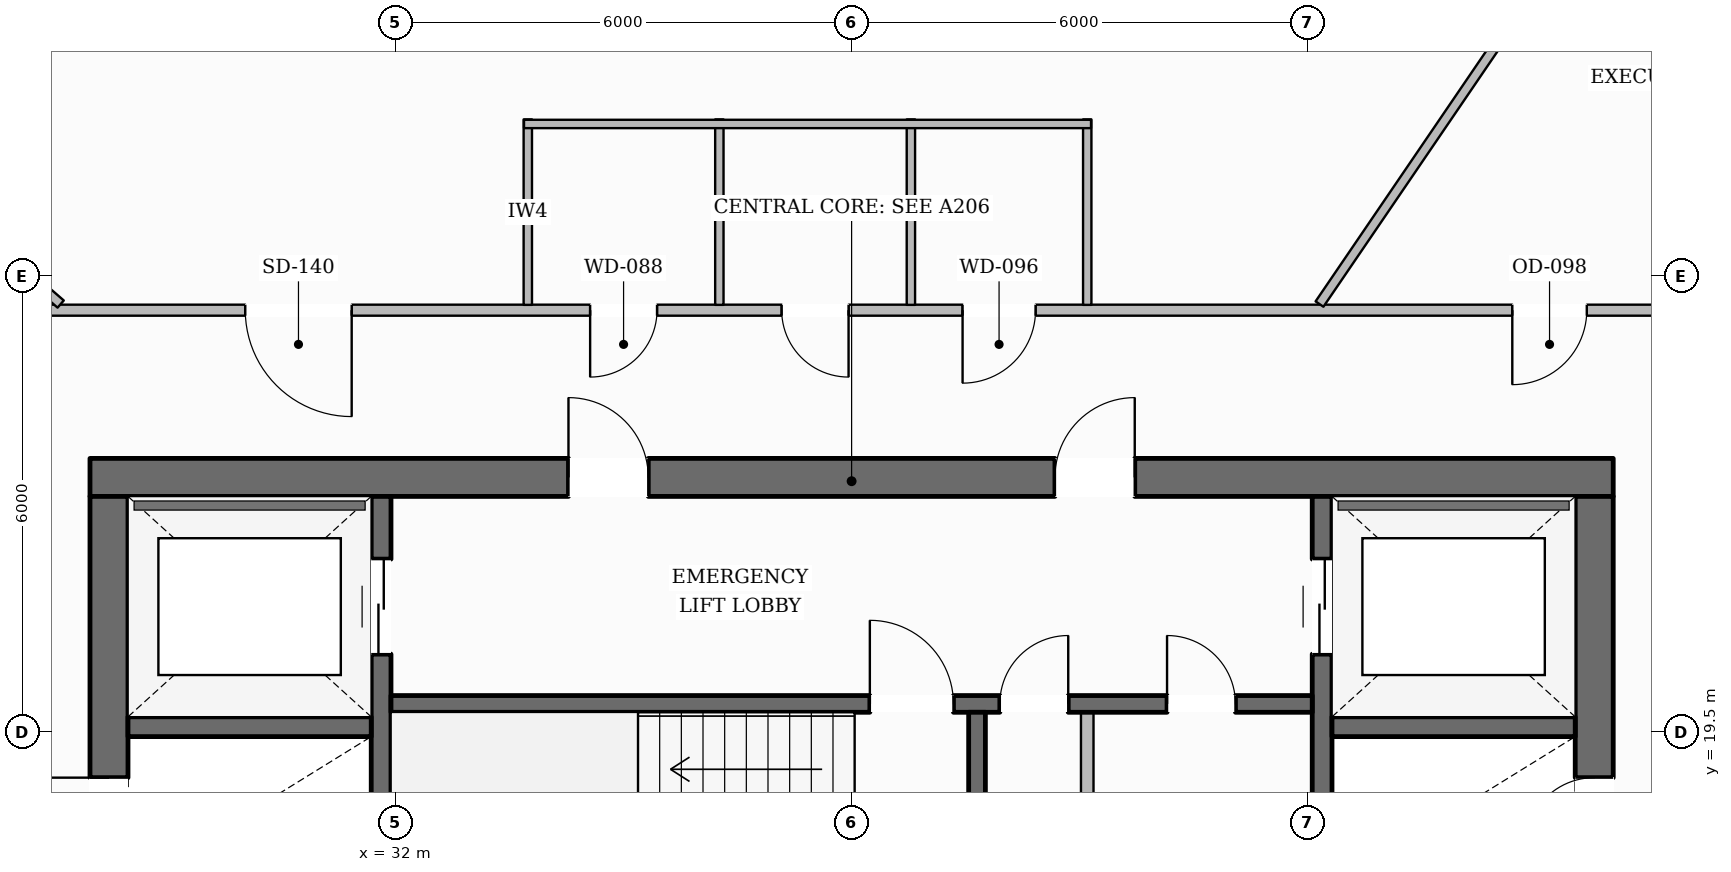
"""IFC4 building model, lengths in metres.
Left out: names, types, materials, properties, quantities, classifications, styles, units other than length and angle.
Written with IfcOpenShell. Run it as: python <this file> out.ifc"""

import sys

from ifc_helpers import new_model, si_unit, direction, frame, frame_2d, origin, place, context, subcontext, project, spatial, rectangle, extrude, element, fill, save


model = new_model("IFC4")
c1 = context("Model", 3, precision=1e-05, world=origin(), true_north=direction((0.0, 1.0)))
c2 = subcontext(c1, "Body", "Model", "MODEL_VIEW")
j1 = project(units=[si_unit("LENGTHUNIT", "METRE"), si_unit("PLANEANGLEUNIT", "RADIAN")], contexts=[c1])
p1 = place(None, origin())
s1 = spatial("IfcSite", under=j1, at=p1, CompositionType="ELEMENT")
p2 = place(p1, origin())
s2 = spatial("IfcBuilding", under=s1, at=p2, CompositionType="ELEMENT")
p3 = place(p2, frame((0.0, 0.0, 112.45)))
s3 = spatial("IfcBuildingStorey", under=s2, at=p3, CompositionType="ELEMENT", Elevation=112.45)
p4 = place(p3, frame((27.98, 22.85, 0.0), z_axis=(0.0, 0.0, 1.0), x_axis=(1.0, 0.0, 0.0)))
e1 = element("IfcWall", 1, at=p4, inside=s3, PredefinedType="SOLIDWALL", context=c2, shape_type="SweptSolid", body=[
    extrude(rectangle(XDim=20.04, YDim=0.5, at=frame_2d((10.02, 0.0))), origin(), (0.0, 0.0, 1.0), 3.6),
])
p5 = place(p4, frame((6.295, 0.0, 0.0)))
e2 = element("IfcOpeningElement", 2, at=p5, cuts=e1, PredefinedType="OPENING", context=c2, shape_type="SweptSolid", body=[
    extrude(rectangle(XDim=1.05, YDim=2.15, at=frame_2d((0.525, 1.075))), frame((0.0, 0.26, 0.0), z_axis=(0.0, -1.0, 0.0), x_axis=(1.0, 0.0, 0.0)), (0.0, 0.0, 1.0), 0.52),
])
p6 = place(p4, frame((12.695, 0.0, 0.0)))
e3 = element("IfcOpeningElement", 3, at=p6, cuts=e1, PredefinedType="OPENING", context=c2, shape_type="SweptSolid", body=[
    extrude(rectangle(XDim=1.05, YDim=2.15, at=frame_2d((0.525, 1.075))), frame((0.0, 0.26, 0.0), z_axis=(0.0, -1.0, 0.0), x_axis=(1.0, 0.0, 0.0)), (0.0, 0.0, 1.0), 0.52),
])
p7 = place(p3, frame((28.23, 9.6, 0.0), z_axis=(0.0, 0.0, 1.0), x_axis=(0.0, 1.0, 0.0)))
e4 = element("IfcWall", 4, at=p7, inside=s3, PredefinedType="SOLIDWALL", context=c2, shape_type="SweptSolid", body=[
    extrude(rectangle(XDim=13.0, YDim=0.5, at=frame_2d((6.5, 0.0))), origin(), (0.0, 0.0, 1.0), 3.6),
])
p8 = place(p7, frame((0.2, 0.0, 0.0)))
e5 = element("IfcOpeningElement", 5, at=p8, cuts=e4, PredefinedType="OPENING", context=c2, shape_type="SweptSolid", body=[
    extrude(rectangle(XDim=1.1, YDim=2.15, at=frame_2d((0.55, 1.075))), frame((0.0, 0.26, 0.0), z_axis=(0.0, -1.0, 0.0), x_axis=(1.0, 0.0, 0.0)), (0.0, 0.0, 1.0), 0.52),
])
p9 = place(p7, frame((8.4, 0.0, 0.0)))
e6 = element("IfcOpeningElement", 6, at=p9, cuts=e4, PredefinedType="OPENING", context=c2, shape_type="SweptSolid", body=[
    extrude(rectangle(XDim=0.9, YDim=2.1, at=frame_2d((0.45, 1.05))), frame((0.0, 0.26, 0.0), z_axis=(0.0, -1.0, 0.0), x_axis=(1.0, 0.0, 0.0)), (0.0, 0.0, 1.0), 0.52),
])
p10 = place(p3, frame((47.77, 9.6, 0.0), z_axis=(0.0, 0.0, 1.0), x_axis=(0.0, 1.0, 0.0)))
e7 = element("IfcWall", 7, at=p10, inside=s3, PredefinedType="SOLIDWALL", context=c2, shape_type="SweptSolid", body=[
    extrude(rectangle(XDim=13.0, YDim=0.5, at=frame_2d((6.5, 0.0))), origin(), (0.0, 0.0, 1.0), 3.6),
])
p11 = place(p10, frame((0.2, 0.0, 0.0)))
e8 = element("IfcOpeningElement", 8, at=p11, cuts=e7, PredefinedType="OPENING", context=c2, shape_type="SweptSolid", body=[
    extrude(rectangle(XDim=1.1, YDim=2.15, at=frame_2d((0.55, 1.075))), frame((0.0, 0.26, 0.0), z_axis=(0.0, -1.0, 0.0), x_axis=(1.0, 0.0, 0.0)), (0.0, 0.0, 1.0), 0.52),
])
p12 = place(p10, frame((8.4, 0.0, 0.0)))
e9 = element("IfcOpeningElement", 9, at=p12, cuts=e7, PredefinedType="OPENING", context=c2, shape_type="SweptSolid", body=[
    extrude(rectangle(XDim=0.9, YDim=2.1, at=frame_2d((0.45, 1.05))), frame((0.0, 0.26, 0.0), z_axis=(0.0, -1.0, 0.0), x_axis=(1.0, 0.0, 0.0)), (0.0, 0.0, 1.0), 0.52),
])
p13 = place(p3, frame((31.81, 9.6, 0.0), z_axis=(0.0, 0.0, 1.0), x_axis=(0.0, 1.0, 0.0)))
e10 = element("IfcWall", 10, at=p13, inside=s3, PredefinedType="SHEAR", context=c2, shape_type="SweptSolid", body=[
    extrude(rectangle(XDim=13.0, YDim=0.26, at=frame_2d((6.5, 0.0))), origin(), (0.0, 0.0, 1.0), 3.6),
])
p14 = place(p13, frame((10.925, 0.0, 0.0)))
e11 = element("IfcOpeningElement", 11, at=p14, cuts=e10, PredefinedType="OPENING", context=c2, shape_type="SweptSolid", body=[
    extrude(rectangle(XDim=1.25, YDim=2.25, at=frame_2d((0.625, 1.125))), frame((0.0, 0.14, 0.0), z_axis=(0.0, -1.0, 0.0), x_axis=(1.0, 0.0, 0.0)), (0.0, 0.0, 1.0), 0.28),
])
p15 = place(p3, frame((44.19, 9.6, 0.0), z_axis=(0.0, 0.0, 1.0), x_axis=(0.0, 1.0, 0.0)))
e12 = element("IfcWall", 12, at=p15, inside=s3, PredefinedType="SHEAR", context=c2, shape_type="SweptSolid", body=[
    extrude(rectangle(XDim=13.0, YDim=0.26, at=frame_2d((6.5, 0.0))), origin(), (0.0, 0.0, 1.0), 3.6),
])
p16 = place(p15, frame((10.925, 0.0, 0.0)))
e13 = element("IfcOpeningElement", 13, at=p16, cuts=e12, PredefinedType="OPENING", context=c2, shape_type="SweptSolid", body=[
    extrude(rectangle(XDim=1.25, YDim=2.25, at=frame_2d((0.625, 1.125))), frame((0.0, 0.14, 0.0), z_axis=(0.0, -1.0, 0.0), x_axis=(1.0, 0.0, 0.0)), (0.0, 0.0, 1.0), 0.28),
])
for number, where, z_axis, x_axis in (
    (14, (28.48, 19.57, 0.0), (0.0, 0.0, 1.0), (1.0, 0.0, 0.0)),
    (15, (44.32, 19.57, 0.0), (0.0, 0.0, 1.0), (1.0, 0.0, 0.0)),
):
    element("IfcWall", number, at=place(p3, frame(where, z_axis=z_axis, x_axis=x_axis)), inside=s3, PredefinedType="SHEAR", context=c2, shape_type="SweptSolid", body=[
        extrude(rectangle(XDim=3.2, YDim=0.26, at=frame_2d((1.6, 0.0))), origin(), (0.0, 0.0, 1.0), 3.6),
    ])
p17 = place(p3, frame((31.94, 19.87, 0.0), z_axis=(0.0, 0.0, 1.0), x_axis=(1.0, 0.0, 0.0)))
e16 = element("IfcWall", 16, at=p17, inside=s3, PredefinedType="SOLIDWALL", context=c2, shape_type="SweptSolid", body=[
    extrude(rectangle(XDim=12.12, YDim=0.22, at=frame_2d((6.06, 0.0))), origin(), (0.0, 0.0, 1.0), 3.6),
])
p18 = place(p17, frame((6.3, 0.0, 0.0)))
e17 = element("IfcOpeningElement", 17, at=p18, cuts=e16, PredefinedType="OPENING", context=c2, shape_type="SweptSolid", body=[
    extrude(rectangle(XDim=1.1, YDim=2.15, at=frame_2d((0.55, 1.075))), frame((0.0, 0.12, 0.0), z_axis=(0.0, -1.0, 0.0), x_axis=(1.0, 0.0, 0.0)), (0.0, 0.0, 1.0), 0.24),
])
p19 = place(p17, frame((8.01, 0.0, 0.0)))
e18 = element("IfcOpeningElement", 18, at=p19, cuts=e16, PredefinedType="OPENING", context=c2, shape_type="SweptSolid", body=[
    extrude(rectangle(XDim=0.9, YDim=2.1, at=frame_2d((0.45, 1.05))), frame((0.0, 0.12, 0.0), z_axis=(0.0, -1.0, 0.0), x_axis=(1.0, 0.0, 0.0)), (0.0, 0.0, 1.0), 0.24),
])
p20 = place(p17, frame((10.21, 0.0, 0.0)))
e19 = element("IfcOpeningElement", 19, at=p20, cuts=e16, PredefinedType="OPENING", context=c2, shape_type="SweptSolid", body=[
    extrude(rectangle(XDim=0.9, YDim=2.1, at=frame_2d((0.45, 1.05))), frame((0.0, 0.12, 0.0), z_axis=(0.0, -1.0, 0.0), x_axis=(1.0, 0.0, 0.0)), (0.0, 0.0, 1.0), 0.24),
])
p21 = place(p3, frame((39.65, 16.56, 0.0), z_axis=(0.0, 0.0, 1.0), x_axis=(0.0, 1.0, 0.0)))
e20 = element("IfcWall", 20, at=p21, inside=s3, PredefinedType="SOLIDWALL", context=c2, shape_type="SweptSolid", body=[
    extrude(rectangle(XDim=3.2, YDim=0.22, at=frame_2d((1.6, 0.0))), origin(), (0.0, 0.0, 1.0), 3.6),
])
p22 = place(p3, frame((14.144, 13.219, 0.0), z_axis=(0.0, 0.0, 1.0), x_axis=(0.494900960409, 0.868949388277, 0.0)))
e21 = element("IfcWall", 21, at=p22, inside=s3, PredefinedType="STANDARD", context=c2, shape_type="SweptSolid", body=[
    extrude(rectangle(XDim=36.225, YDim=0.38, at=frame_2d((18.113, 0.0))), origin(), (0.0, 0.0, 1.0), 3.059),
])
p23 = place(p22, frame((32.03, 0.0, 0.65)))
e22 = element("IfcOpeningElement", 22, at=p23, cuts=e21, PredefinedType="OPENING", context=c2, shape_type="SweptSolid", body=[
    extrude(rectangle(XDim=1.55, YDim=1.75, at=frame_2d((0.775, 0.875))), frame((0.0, 0.2, 0.0), z_axis=(0.0, -1.0, 0.0), x_axis=(1.0, 0.0, 0.0)), (0.0, 0.0, 1.0), 0.4),
])
p24 = place(p22, frame((26.152, 0.0, 0.65)))
e23 = element("IfcOpeningElement", 23, at=p24, cuts=e21, PredefinedType="OPENING", context=c2, shape_type="SweptSolid", body=[
    extrude(rectangle(XDim=1.55, YDim=1.75, at=frame_2d((0.775, 0.875))), frame((0.0, 0.2, 0.0), z_axis=(0.0, -1.0, 0.0), x_axis=(1.0, 0.0, 0.0)), (0.0, 0.0, 1.0), 0.4),
])
p25 = place(p22, frame((20.274, 0.0, 0.65)))
e24 = element("IfcOpeningElement", 24, at=p25, cuts=e21, PredefinedType="OPENING", context=c2, shape_type="SweptSolid", body=[
    extrude(rectangle(XDim=1.55, YDim=1.75, at=frame_2d((0.775, 0.875))), frame((0.0, 0.2, 0.0), z_axis=(0.0, -1.0, 0.0), x_axis=(1.0, 0.0, 0.0)), (0.0, 0.0, 1.0), 0.4),
])
p26 = place(p22, frame((8.518, 0.0, 0.65)))
e25 = element("IfcOpeningElement", 25, at=p26, cuts=e21, PredefinedType="OPENING", context=c2, shape_type="SweptSolid", body=[
    extrude(rectangle(XDim=1.55, YDim=1.75, at=frame_2d((0.775, 0.875))), frame((0.0, 0.2, 0.0), z_axis=(0.0, -1.0, 0.0), x_axis=(1.0, 0.0, 0.0)), (0.0, 0.0, 1.0), 0.4),
])
p27 = place(p22, frame((2.64, 0.0, 0.65)))
e26 = element("IfcOpeningElement", 26, at=p27, cuts=e21, PredefinedType="OPENING", context=c2, shape_type="SweptSolid", body=[
    extrude(rectangle(XDim=1.55, YDim=1.75, at=frame_2d((0.775, 0.875))), frame((0.0, 0.2, 0.0), z_axis=(0.0, -1.0, 0.0), x_axis=(1.0, 0.0, 0.0)), (0.0, 0.0, 1.0), 0.4),
])
p28 = place(p3, frame((44.076, 44.609, 0.0), z_axis=(0.0, 0.0, 1.0), x_axis=(0.500826973377, -0.865547423737, 0.0)))
e27 = element("IfcWall", 27, at=p28, inside=s3, PredefinedType="STANDARD", context=c2, shape_type="SweptSolid", body=[
    extrude(rectangle(XDim=36.65, YDim=0.38, at=frame_2d((18.325, 0.0))), origin(), (0.0, 0.0, 1.0), 3.059),
])
p29 = place(p28, frame((26.887, 0.0, 0.0)))
e28 = element("IfcOpeningElement", 28, at=p29, cuts=e27, PredefinedType="OPENING", context=c2, shape_type="SweptSolid", body=[
    extrude(rectangle(XDim=1.0, YDim=2.2, at=frame_2d((0.5, 1.1))), frame((0.0, 0.2, 0.0), z_axis=(0.0, -1.0, 0.0), x_axis=(1.0, 0.0, 0.0)), (0.0, 0.0, 1.0), 0.4),
])
p30 = place(p28, frame((32.424, 0.0, 0.65)))
e29 = element("IfcOpeningElement", 29, at=p30, cuts=e27, PredefinedType="OPENING", context=c2, shape_type="SweptSolid", body=[
    extrude(rectangle(XDim=1.55, YDim=1.75, at=frame_2d((0.775, 0.875))), frame((0.0, 0.2, 0.0), z_axis=(0.0, -1.0, 0.0), x_axis=(1.0, 0.0, 0.0)), (0.0, 0.0, 1.0), 0.4),
])
p31 = place(p28, frame((20.524, 0.0, 0.65)))
e30 = element("IfcOpeningElement", 30, at=p31, cuts=e27, PredefinedType="OPENING", context=c2, shape_type="SweptSolid", body=[
    extrude(rectangle(XDim=1.55, YDim=1.75, at=frame_2d((0.775, 0.875))), frame((0.0, 0.2, 0.0), z_axis=(0.0, -1.0, 0.0), x_axis=(1.0, 0.0, 0.0)), (0.0, 0.0, 1.0), 0.4),
])
p32 = place(p28, frame((8.625, 0.0, 0.65)))
e31 = element("IfcOpeningElement", 31, at=p32, cuts=e27, PredefinedType="OPENING", context=c2, shape_type="SweptSolid", body=[
    extrude(rectangle(XDim=1.55, YDim=1.75, at=frame_2d((0.775, 0.875))), frame((0.0, 0.2, 0.0), z_axis=(0.0, -1.0, 0.0), x_axis=(1.0, 0.0, 0.0)), (0.0, 0.0, 1.0), 0.4),
])
p33 = place(p28, frame((2.675, 0.0, 0.65)))
e32 = element("IfcOpeningElement", 32, at=p33, cuts=e27, PredefinedType="OPENING", context=c2, shape_type="SweptSolid", body=[
    extrude(rectangle(XDim=1.55, YDim=1.75, at=frame_2d((0.775, 0.875))), frame((0.0, 0.2, 0.0), z_axis=(0.0, -1.0, 0.0), x_axis=(1.0, 0.0, 0.0)), (0.0, 0.0, 1.0), 0.4),
])
p34 = place(p3, frame((41.1, 16.56, 0.0), z_axis=(0.0, 0.0, 1.0), x_axis=(0.0, 1.0, 0.0)))
e33 = element("IfcWall", 33, at=p34, inside=s3, PredefinedType="PARTITIONING", context=c2, shape_type="SweptSolid", body=[
    extrude(rectangle(XDim=3.2, YDim=0.165, at=frame_2d((1.6, 0.0))), origin(), (0.0, 0.0, 1.0), 3.6),
])
p35 = place(p3, frame((49.97, 25.05, 0.0), z_axis=(0.0, 0.0, 1.0), x_axis=(-1.0, 0.0, 0.0)))
e34 = element("IfcWall", 34, at=p35, inside=s3, PredefinedType="PARTITIONING", context=c2, shape_type="SweptSolid", body=[
    extrude(rectangle(XDim=23.94, YDim=0.145, at=frame_2d((11.97, 0.0))), origin(), (0.0, 0.0, 1.0), 3.6),
])
p36 = place(p35, frame((14.53, 0.0, 0.0)))
e35 = element("IfcOpeningElement", 35, at=p36, cuts=e34, PredefinedType="OPENING", context=c2, shape_type="SweptSolid", body=[
    extrude(rectangle(XDim=0.88, YDim=2.1, at=frame_2d((0.44, 1.05))), frame((0.0, 0.083, 0.0), z_axis=(0.0, -1.0, 0.0), x_axis=(1.0, 0.0, 0.0)), (0.0, 0.0, 1.0), 0.165),
])
p37 = place(p35, frame((12.01, 0.0, 0.0)))
e36 = element("IfcOpeningElement", 36, at=p37, cuts=e34, PredefinedType="OPENING", context=c2, shape_type="SweptSolid", body=[
    extrude(rectangle(XDim=0.88, YDim=2.1, at=frame_2d((0.44, 1.05))), frame((0.0, 0.083, 0.0), z_axis=(0.0, -1.0, 0.0), x_axis=(1.0, 0.0, 0.0)), (0.0, 0.0, 1.0), 0.165),
])
p38 = place(p35, frame((9.55, 0.0, 0.0)))
e37 = element("IfcOpeningElement", 37, at=p38, cuts=e34, PredefinedType="OPENING", context=c2, shape_type="SweptSolid", body=[
    extrude(rectangle(XDim=0.96, YDim=2.1, at=frame_2d((0.48, 1.05))), frame((0.0, 0.083, 0.0), z_axis=(0.0, -1.0, 0.0), x_axis=(1.0, 0.0, 0.0)), (0.0, 0.0, 1.0), 0.165),
])
p39 = place(p35, frame((2.298, 0.0, 0.0)))
e38 = element("IfcOpeningElement", 38, at=p39, cuts=e34, PredefinedType="OPENING", context=c2, shape_type="SweptSolid", body=[
    extrude(rectangle(XDim=0.98, YDim=2.15, at=frame_2d((0.49, 1.075))), frame((0.0, 0.083, 0.0), z_axis=(0.0, -1.0, 0.0), x_axis=(1.0, 0.0, 0.0)), (0.0, 0.0, 1.0), 0.165),
])
p40 = place(p35, frame((18.547, 0.0, 0.0)))
e39 = element("IfcOpeningElement", 39, at=p40, cuts=e34, PredefinedType="OPENING", context=c2, shape_type="SweptSolid", body=[
    extrude(rectangle(XDim=1.4, YDim=2.2, at=frame_2d((0.7, 1.1))), frame((0.0, 0.083, 0.0), z_axis=(0.0, -1.0, 0.0), x_axis=(1.0, 0.0, 0.0)), (0.0, 0.0, 1.0), 0.165),
])
for number, where, z_axis, x_axis in (
    (40, (33.74, 25.12, 0.0), (0.0, 0.0, 1.0), (0.0, 1.0, 0.0)),
    (41, (36.26, 25.12, 0.0), (0.0, 0.0, 1.0), (0.0, 1.0, 0.0)),
    (42, (38.78, 25.12, 0.0), (0.0, 0.0, 1.0), (0.0, 1.0, 0.0)),
    (43, (41.1, 25.12, 0.0), (0.0, 0.0, 1.0), (0.0, 1.0, 0.0)),
):
    element("IfcWall", number, at=place(p3, frame(where, z_axis=z_axis, x_axis=x_axis)), inside=s3, PredefinedType="PLUMBINGWALL", context=c2, shape_type="SweptSolid", body=[
        extrude(rectangle(XDim=2.44, YDim=0.11, at=frame_2d((1.22, 0.0))), origin(), (0.0, 0.0, 1.0), 3.6),
    ])
p41 = place(p3, frame((33.69, 27.5, 0.0), z_axis=(0.0, 0.0, 1.0), x_axis=(1.0, 0.0, 0.0)))
e44 = element("IfcWall", 44, at=p41, inside=s3, PredefinedType="PLUMBINGWALL", context=c2, shape_type="SweptSolid", body=[
    extrude(rectangle(XDim=7.46, YDim=0.11, at=frame_2d((3.73, 0.0))), origin(), (0.0, 0.0, 1.0), 3.6),
])
p42 = place(p3, frame((44.156, 25.131, 0.0), z_axis=(0.0, 0.0, 1.0), x_axis=(0.563244412967, 0.826290343197, 0.0)))
e45 = element("IfcWall", 45, at=p42, inside=s3, PredefinedType="PARTITIONING", context=c2, shape_type="SweptSolid", body=[
    extrude(rectangle(XDim=10.001, YDim=0.125, at=frame_2d((5.001, 0.0))), origin(), (0.0, 0.0, 1.0), 3.6),
])
p43 = place(p3, frame((27.594, 25.131, 0.0), z_axis=(0.0, 0.0, 1.0), x_axis=(-0.75527236731, 0.655411055124, 0.0)))
e46 = element("IfcWall", 46, at=p43, inside=s3, PredefinedType="PARTITIONING", context=c2, shape_type="SweptSolid", body=[
    extrude(rectangle(XDim=5.144, YDim=0.125, at=frame_2d((2.572, 0.0))), origin(), (0.0, 0.0, 1.0), 3.141),
])
p44 = place(p18, origin())
e47 = element("IfcDoor", 47, at=p44, inside=s3, OperationType="SINGLE_SWING_LEFT", PredefinedType="DOOR", context=c2, shape_type="SweptSolid", body=[
    extrude(rectangle(XDim=1.1, YDim=2.15, at=frame_2d((0.55, 1.075))), frame((0.0, 0.025, 0.0), z_axis=(0.0, -1.0, 0.0), x_axis=(1.0, 0.0, 0.0)), (0.0, 0.0, 1.0), 0.05),
])
fill(e17, e47)
p45 = place(p9, origin())
e48 = element("IfcDoor", 48, at=p45, inside=s3, OperationType="SINGLE_SWING_RIGHT", PredefinedType="DOOR", context=c2, shape_type="SweptSolid", body=[
    extrude(rectangle(XDim=0.9, YDim=2.1, at=frame_2d((0.45, 1.05))), frame((0.0, 0.025, 0.0), z_axis=(0.0, -1.0, 0.0), x_axis=(1.0, 0.0, 0.0)), (0.0, 0.0, 1.0), 0.05),
])
fill(e6, e48)
p46 = place(p12, origin())
e49 = element("IfcDoor", 49, at=p46, inside=s3, OperationType="SINGLE_SWING_LEFT", PredefinedType="DOOR", context=c2, shape_type="SweptSolid", body=[
    extrude(rectangle(XDim=0.9, YDim=2.1, at=frame_2d((0.45, 1.05))), frame((0.0, 0.025, 0.0), z_axis=(0.0, -1.0, 0.0), x_axis=(1.0, 0.0, 0.0)), (0.0, 0.0, 1.0), 0.05),
])
fill(e9, e49)
p47 = place(p5, origin())
e50 = element("IfcDoor", 50, at=p47, inside=s3, OperationType="SINGLE_SWING_LEFT", PredefinedType="DOOR", context=c2, shape_type="SweptSolid", body=[
    extrude(rectangle(XDim=1.05, YDim=2.15, at=frame_2d((0.525, 1.075))), frame((0.0, 0.025, 0.0), z_axis=(0.0, -1.0, 0.0), x_axis=(1.0, 0.0, 0.0)), (0.0, 0.0, 1.0), 0.05),
])
fill(e2, e50)
p48 = place(p6, origin())
e51 = element("IfcDoor", 51, at=p48, inside=s3, OperationType="SINGLE_SWING_RIGHT", PredefinedType="DOOR", context=c2, shape_type="SweptSolid", body=[
    extrude(rectangle(XDim=1.05, YDim=2.15, at=frame_2d((0.525, 1.075))), frame((0.0, 0.025, 0.0), z_axis=(0.0, -1.0, 0.0), x_axis=(1.0, 0.0, 0.0)), (0.0, 0.0, 1.0), 0.05),
])
fill(e3, e51)
p49 = place(p14, origin())
e52 = element("IfcDoor", 52, at=p49, inside=s3, OperationType="DOUBLE_DOOR_SLIDING", PredefinedType="DOOR", context=c2, shape_type="SweptSolid", body=[
    extrude(rectangle(XDim=1.25, YDim=2.25, at=frame_2d((0.625, 1.125))), frame((0.0, 0.025, 0.0), z_axis=(0.0, -1.0, 0.0), x_axis=(1.0, 0.0, 0.0)), (0.0, 0.0, 1.0), 0.05),
])
fill(e11, e52)
p50 = place(p16, origin())
e53 = element("IfcDoor", 53, at=p50, inside=s3, OperationType="DOUBLE_DOOR_SLIDING", PredefinedType="DOOR", context=c2, shape_type="SweptSolid", body=[
    extrude(rectangle(XDim=1.25, YDim=2.25, at=frame_2d((0.625, 1.125))), frame((0.0, 0.025, 0.0), z_axis=(0.0, -1.0, 0.0), x_axis=(1.0, 0.0, 0.0)), (0.0, 0.0, 1.0), 0.05),
])
fill(e13, e53)
p51 = place(p19, origin())
e54 = element("IfcDoor", 54, at=p51, inside=s3, OperationType="SINGLE_SWING_RIGHT", PredefinedType="DOOR", context=c2, shape_type="SweptSolid", body=[
    extrude(rectangle(XDim=0.9, YDim=2.1, at=frame_2d((0.45, 1.05))), frame((0.0, 0.025, 0.0), z_axis=(0.0, -1.0, 0.0), x_axis=(1.0, 0.0, 0.0)), (0.0, 0.0, 1.0), 0.05),
])
fill(e18, e54)
p52 = place(p20, origin())
e55 = element("IfcDoor", 55, at=p52, inside=s3, OperationType="SINGLE_SWING_LEFT", PredefinedType="DOOR", context=c2, shape_type="SweptSolid", body=[
    extrude(rectangle(XDim=0.9, YDim=2.1, at=frame_2d((0.45, 1.05))), frame((0.0, 0.025, 0.0), z_axis=(0.0, -1.0, 0.0), x_axis=(1.0, 0.0, 0.0)), (0.0, 0.0, 1.0), 0.05),
])
fill(e19, e55)
p53 = place(p36, origin())
e56 = element("IfcDoor", 56, at=p53, inside=s3, OperationType="SINGLE_SWING_RIGHT", PredefinedType="DOOR", context=c2, shape_type="SweptSolid", body=[
    extrude(rectangle(XDim=0.88, YDim=2.1, at=frame_2d((0.44, 1.05))), frame((0.0, 0.025, 0.0), z_axis=(0.0, -1.0, 0.0), x_axis=(1.0, 0.0, 0.0)), (0.0, 0.0, 1.0), 0.05),
])
fill(e35, e56)
p54 = place(p37, origin())
e57 = element("IfcDoor", 57, at=p54, inside=s3, OperationType="SINGLE_SWING_LEFT", PredefinedType="DOOR", context=c2, shape_type="SweptSolid", body=[
    extrude(rectangle(XDim=0.88, YDim=2.1, at=frame_2d((0.44, 1.05))), frame((0.0, 0.025, 0.0), z_axis=(0.0, -1.0, 0.0), x_axis=(1.0, 0.0, 0.0)), (0.0, 0.0, 1.0), 0.05),
])
fill(e36, e57)
p55 = place(p38, origin())
e58 = element("IfcDoor", 58, at=p55, inside=s3, OperationType="SINGLE_SWING_RIGHT", PredefinedType="DOOR", context=c2, shape_type="SweptSolid", body=[
    extrude(rectangle(XDim=0.96, YDim=2.1, at=frame_2d((0.48, 1.05))), frame((0.0, 0.025, 0.0), z_axis=(0.0, -1.0, 0.0), x_axis=(1.0, 0.0, 0.0)), (0.0, 0.0, 1.0), 0.05),
])
fill(e37, e58)
p56 = place(p39, origin())
e59 = element("IfcDoor", 59, at=p56, inside=s3, OperationType="SINGLE_SWING_RIGHT", PredefinedType="DOOR", context=c2, shape_type="SweptSolid", body=[
    extrude(rectangle(XDim=0.98, YDim=2.15, at=frame_2d((0.49, 1.075))), frame((0.0, 0.025, 0.0), z_axis=(0.0, -1.0, 0.0), x_axis=(1.0, 0.0, 0.0)), (0.0, 0.0, 1.0), 0.05),
])
fill(e38, e59)
p57 = place(p40, origin())
e60 = element("IfcDoor", 60, at=p57, inside=s3, OperationType="SINGLE_SWING_LEFT", PredefinedType="DOOR", context=c2, shape_type="SweptSolid", body=[
    extrude(rectangle(XDim=1.4, YDim=2.2, at=frame_2d((0.7, 1.1))), frame((0.0, 0.025, 0.0), z_axis=(0.0, -1.0, 0.0), x_axis=(1.0, 0.0, 0.0)), (0.0, 0.0, 1.0), 0.05),
])
fill(e39, e60)
save(model, sys.argv[1])
